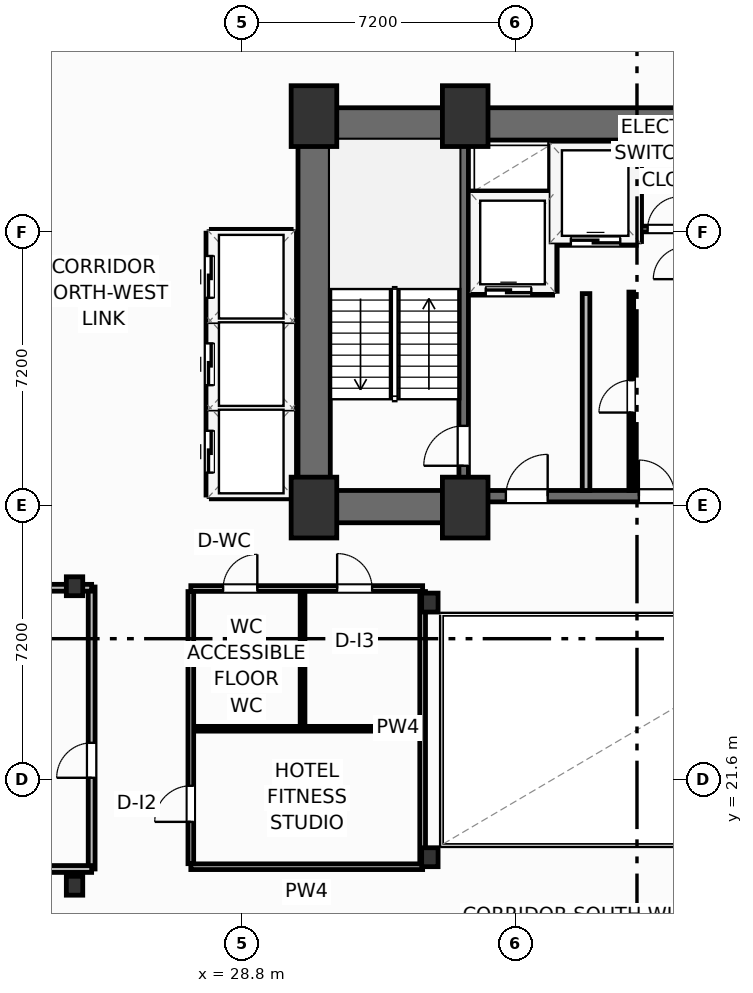
"""IFC4 building model, lengths in metres.
Left out: names, types, materials, properties, quantities, classifications, styles, units other than length and angle.
Written with IfcOpenShell. Run it as: python <this file> out.ifc"""

import sys

from ifc_helpers import new_model, si_unit, direction, frame, frame_2d, origin, origin_2d, place, context, subcontext, project, spatial, rectangle, i_section, extrude, element, fill, save


model = new_model("IFC4")
c1 = context("Model", 3, precision=1e-05, world=origin(), true_north=direction((0.0, 1.0)))
c2 = subcontext(c1, "Body", "Model", "MODEL_VIEW")
j1 = project(units=[si_unit("LENGTHUNIT", "METRE"), si_unit("PLANEANGLEUNIT", "RADIAN")], contexts=[c1])
p1 = place(None, origin())
s1 = spatial("IfcSite", under=j1, at=p1, CompositionType="ELEMENT")
p2 = place(p1, origin())
s2 = spatial("IfcBuilding", under=s1, at=p2, CompositionType="ELEMENT")
p3 = place(p2, frame((0.0, 0.0, 49.2)))
s3 = spatial("IfcBuildingStorey", under=s2, at=p3, CompositionType="ELEMENT", Elevation=49.2)
for number, where, z_axis, x_axis in (
    (1, (30.7, 28.75, 0.0), (0.0, 0.0, 1.0), (1.0, 0.0, 0.0)),
    (2, (34.68, 28.75, 0.0), (0.0, 0.0, 1.0), (1.0, 0.0, 0.0)),
    (3, (30.7, 39.05, 0.0), (0.0, 0.0, 1.0), (1.0, 0.0, 0.0)),
    (4, (34.68, 39.05, 0.0), (0.0, 0.0, 1.0), (1.0, 0.0, 0.0)),
):
    element("IfcColumn", number, at=place(p3, frame(where, z_axis=z_axis, x_axis=x_axis)), inside=s3, PredefinedType="COLUMN", context=c2, shape_type="SweptSolid", body=[
        extrude(rectangle(XDim=1.2, YDim=1.6, at=origin_2d()), origin(), (0.0, 0.0, 1.0), 3.7),
    ])
for number, where, z_axis, x_axis in (
    (5, (33.75, 19.55, 0.0), (0.0, 0.0, 1.0), (1.0, 0.0, 0.0)),
    (6, (33.75, 26.25, 0.0), (0.0, 0.0, 1.0), (1.0, 0.0, 0.0)),
    (7, (24.4, 18.8, 0.0), (0.0, 0.0, 1.0), (1.0, 0.0, 0.0)),
    (8, (24.4, 26.68, 0.0), (0.0, 0.0, 1.0), (1.0, 0.0, 0.0)),
):
    element("IfcColumn", number, at=place(p3, frame(where, z_axis=z_axis, x_axis=x_axis)), inside=s3, PredefinedType="COLUMN", context=c2, shape_type="SweptSolid", body=[
        extrude(i_section(OverallWidth=0.432, OverallDepth=0.498, WebThickness=0.056, FlangeThickness=0.089, FilletRadius=0.025, at=origin_2d()), origin(), (0.0, 0.0, 1.0), 3.7),
    ])
p4 = place(p3, frame((30.28, 38.845, 0.0), z_axis=(0.0, 0.0, 1.0), x_axis=(1.0, 0.0, 0.0)))
e9 = element("IfcWall", 9, at=p4, inside=s3, PredefinedType="SHEAR", context=c2, shape_type="SweptSolid", body=[
    extrude(rectangle(XDim=17.84, YDim=0.85, at=frame_2d((8.92, 0.0))), origin(), (0.0, 0.0, 1.0), 3.45),
])
p5 = place(p3, frame((30.705, 29.2, 0.0), z_axis=(0.0, 0.0, 1.0), x_axis=(0.0, 1.0, 0.0)))
e10 = element("IfcWall", 10, at=p5, inside=s3, PredefinedType="SHEAR", context=c2, shape_type="SweptSolid", body=[
    extrude(rectangle(XDim=9.22, YDim=0.85, at=frame_2d((4.61, 0.0))), origin(), (0.0, 0.0, 1.0), 3.45),
])
p6 = place(p3, frame((30.28, 28.775, 0.0), z_axis=(0.0, 0.0, 1.0), x_axis=(1.0, 0.0, 0.0)))
e11 = element("IfcWall", 11, at=p6, inside=s3, PredefinedType="SHEAR", context=c2, shape_type="SweptSolid", body=[
    extrude(rectangle(XDim=4.52, YDim=0.85, at=frame_2d((2.26, 0.0))), origin(), (0.0, 0.0, 1.0), 3.45),
])
p7 = place(p3, frame((34.8, 29.05, 0.0), z_axis=(0.0, 0.0, 1.0), x_axis=(1.0, 0.0, 0.0)))
e12 = element("IfcWall", 12, at=p7, inside=s3, PredefinedType="SHEAR", context=c2, shape_type="SweptSolid", body=[
    extrude(rectangle(XDim=8.8, YDim=0.3, at=frame_2d((4.4, 0.0))), origin(), (0.0, 0.0, 1.0), 3.45),
])
p8 = place(p7, frame((0.95, 0.0, 0.0)))
e13 = element("IfcOpeningElement", 13, at=p8, cuts=e12, PredefinedType="OPENING", context=c2, shape_type="SweptSolid", body=[
    extrude(rectangle(XDim=1.1, YDim=2.15, at=frame_2d((0.55, 1.075))), frame((0.0, 0.16, 0.0), z_axis=(0.0, -1.0, 0.0), x_axis=(1.0, 0.0, 0.0)), (0.0, 0.0, 1.0), 0.32),
])
p9 = place(p7, frame((6.75, 0.0, 0.0)))
e14 = element("IfcOpeningElement", 14, at=p9, cuts=e12, PredefinedType="OPENING", context=c2, shape_type="SweptSolid", body=[
    extrude(rectangle(XDim=1.1, YDim=2.15, at=frame_2d((0.55, 1.075))), frame((0.0, 0.16, 0.0), z_axis=(0.0, -1.0, 0.0), x_axis=(1.0, 0.0, 0.0)), (0.0, 0.0, 1.0), 0.32),
])
p10 = place(p7, frame((4.45, 0.0, 0.0)))
e15 = element("IfcOpeningElement", 15, at=p10, cuts=e12, PredefinedType="OPENING", context=c2, shape_type="SweptSolid", body=[
    extrude(rectangle(XDim=0.95, YDim=2.15, at=frame_2d((0.475, 1.075))), frame((0.0, 0.16, 0.0), z_axis=(0.0, -1.0, 0.0), x_axis=(1.0, 0.0, 0.0)), (0.0, 0.0, 1.0), 0.32),
])
p11 = place(p3, frame((34.64, 29.2, 0.0), z_axis=(0.0, 0.0, 1.0), x_axis=(0.0, 1.0, 0.0)))
e16 = element("IfcWall", 16, at=p11, inside=s3, PredefinedType="SHEAR", context=c2, shape_type="SweptSolid", body=[
    extrude(rectangle(XDim=9.22, YDim=0.25, at=frame_2d((4.61, 0.0))), origin(), (0.0, 0.0, 1.0), 3.45),
])
p12 = place(p11, frame((0.65, 0.0, 0.0)))
e17 = element("IfcOpeningElement", 17, at=p12, cuts=e16, PredefinedType="OPENING", context=c2, shape_type="SweptSolid", body=[
    extrude(rectangle(XDim=1.05, YDim=2.15, at=frame_2d((0.525, 1.075))), frame((0.0, 0.135, 0.0), z_axis=(0.0, -1.0, 0.0), x_axis=(1.0, 0.0, 0.0)), (0.0, 0.0, 1.0), 0.27),
])
p13 = place(p3, frame((24.85, 19.24, 0.0), z_axis=(0.0, 0.0, 1.0), x_axis=(0.0, 1.0, 0.0)))
e18 = element("IfcWall", 18, at=p13, inside=s3, PredefinedType="PARTITIONING", context=c2, shape_type="SweptSolid", body=[
    extrude(rectangle(XDim=7.42, YDim=0.18, at=frame_2d((3.71, 0.0))), origin(), (0.0, 0.0, 1.0), 3.45),
])
p14 = place(p13, frame((2.4, 0.0, 0.0)))
e19 = element("IfcOpeningElement", 19, at=p14, cuts=e18, PredefinedType="OPENING", context=c2, shape_type="SweptSolid", body=[
    extrude(rectangle(XDim=0.92, YDim=2.05, at=frame_2d((0.46, 1.025))), frame((0.0, 0.1, 0.0), z_axis=(0.0, -1.0, 0.0), x_axis=(1.0, 0.0, 0.0)), (0.0, 0.0, 1.0), 0.2),
])
p15 = place(p3, frame((3.645, 19.24, 0.0), z_axis=(0.0, 0.0, 1.0), x_axis=(1.0, 0.0, 0.0)))
e20 = element("IfcWall", 20, at=p15, inside=s3, PredefinedType="PARTITIONING", context=c2, shape_type="SweptSolid", body=[
    extrude(rectangle(XDim=21.205, YDim=0.18, at=frame_2d((10.603, 0.0))), origin(), (0.0, 0.0, 1.0), 2.58),
])
p16 = place(p3, frame((19.2, 26.64, 0.0), z_axis=(0.0, 0.0, 1.0), x_axis=(1.0, 0.0, 0.0)))
e21 = element("IfcWall", 21, at=p16, inside=s3, PredefinedType="PARTITIONING", context=c2, shape_type="SweptSolid", body=[
    extrude(rectangle(XDim=5.65, YDim=0.18, at=frame_2d((2.825, 0.0))), origin(), (0.0, 0.0, 1.0), 2.662),
])
p17 = place(p3, frame((37.86, 29.2, 0.0), z_axis=(0.0, 0.0, 1.0), x_axis=(0.0, 1.0, 0.0)))
e22 = element("IfcWall", 22, at=p17, inside=s3, PredefinedType="PARTITIONING", context=c2, shape_type="SweptSolid", body=[
    extrude(rectangle(XDim=5.18, YDim=0.2, at=frame_2d((2.59, 0.0))), origin(), (0.0, 0.0, 1.0), 3.45),
])
p18 = place(p3, frame((34.8, 34.44, 0.0), z_axis=(0.0, 0.0, 1.0), x_axis=(1.0, 0.0, 0.0)))
e23 = element("IfcWall", 23, at=p18, inside=s3, PredefinedType="PARTITIONING", context=c2, shape_type="SweptSolid", body=[
    extrude(rectangle(XDim=2.18, YDim=0.2, at=frame_2d((1.09, 0.0))), origin(), (0.0, 0.0, 1.0), 3.45),
])
p19 = place(p18, frame((0.42, 0.0, 0.0)))
e24 = element("IfcOpeningElement", 24, at=p19, cuts=e23, PredefinedType="OPENING", context=c2, shape_type="SweptSolid", body=[
    extrude(rectangle(XDim=1.2, YDim=2.2, at=frame_2d((0.6, 1.1))), frame((0.0, 0.11, 0.0), z_axis=(0.0, -1.0, 0.0), x_axis=(1.0, 0.0, 0.0)), (0.0, 0.0, 1.0), 0.22),
])
p20 = place(p3, frame((34.8, 36.98, 0.0), z_axis=(0.0, 0.0, 1.0), x_axis=(1.0, 0.0, 0.0)))
e25 = element("IfcWall", 25, at=p20, inside=s3, PredefinedType="PARTITIONING", context=c2, shape_type="SweptSolid", body=[
    extrude(rectangle(XDim=2.18, YDim=0.2, at=frame_2d((1.09, 0.0))), origin(), (0.0, 0.0, 1.0), 3.45),
])
p21 = place(p3, frame((37.0, 34.44, 0.0), z_axis=(0.0, 0.0, 1.0), x_axis=(0.0, 1.0, 0.0)))
e26 = element("IfcWall", 26, at=p21, inside=s3, PredefinedType="PARTITIONING", context=c2, shape_type="SweptSolid", body=[
    extrude(rectangle(XDim=3.9, YDim=0.2, at=frame_2d((1.95, 0.0))), origin(), (0.0, 0.0, 1.0), 3.45),
])
p22 = place(p3, frame((37.06, 35.75, 0.0), z_axis=(0.0, 0.0, 1.0), x_axis=(1.0, 0.0, 0.0)))
e27 = element("IfcWall", 27, at=p22, inside=s3, PredefinedType="PARTITIONING", context=c2, shape_type="SweptSolid", body=[
    extrude(rectangle(XDim=2.12, YDim=0.2, at=frame_2d((1.06, 0.0))), origin(), (0.0, 0.0, 1.0), 3.45),
])
p23 = place(p22, frame((0.4, 0.0, 0.0)))
e28 = element("IfcOpeningElement", 28, at=p23, cuts=e27, PredefinedType="OPENING", context=c2, shape_type="SweptSolid", body=[
    extrude(rectangle(XDim=1.3, YDim=2.2, at=frame_2d((0.65, 1.1))), frame((0.0, 0.11, 0.0), z_axis=(0.0, -1.0, 0.0), x_axis=(1.0, 0.0, 0.0)), (0.0, 0.0, 1.0), 0.22),
])
p24 = place(p3, frame((39.22, 35.75, 0.0), z_axis=(0.0, 0.0, 1.0), x_axis=(0.0, 1.0, 0.0)))
e29 = element("IfcWall", 29, at=p24, inside=s3, PredefinedType="PARTITIONING", context=c2, shape_type="SweptSolid", body=[
    extrude(rectangle(XDim=2.59, YDim=0.2, at=frame_2d((1.295, 0.0))), origin(), (0.0, 0.0, 1.0), 3.45),
])
p25 = place(p3, frame((39.3, 36.08, 0.0), z_axis=(0.0, 0.0, 1.0), x_axis=(1.0, 0.0, 0.0)))
e30 = element("IfcWall", 30, at=p25, inside=s3, PredefinedType="PARTITIONING", context=c2, shape_type="SweptSolid", body=[
    extrude(rectangle(XDim=2.02, YDim=0.15, at=frame_2d((1.01, 0.0))), origin(), (0.0, 0.0, 1.0), 3.45),
])
p26 = place(p25, frame((0.18, 0.0, 0.0)))
e31 = element("IfcOpeningElement", 31, at=p26, cuts=e30, PredefinedType="OPENING", context=c2, shape_type="SweptSolid", body=[
    extrude(rectangle(XDim=0.85, YDim=2.05, at=frame_2d((0.425, 1.025))), frame((0.0, 0.085, 0.0), z_axis=(0.0, -1.0, 0.0), x_axis=(1.0, 0.0, 0.0)), (0.0, 0.0, 1.0), 0.17),
])
p27 = place(p3, frame((39.05, 29.2, 0.0), z_axis=(0.0, 0.0, 1.0), x_axis=(0.0, 1.0, 0.0)))
e32 = element("IfcWall", 32, at=p27, inside=s3, PredefinedType="PARTITIONING", context=c2, shape_type="SweptSolid", body=[
    extrude(rectangle(XDim=5.22, YDim=0.125, at=frame_2d((2.61, 0.0))), origin(), (0.0, 0.0, 1.0), 3.45),
])
p28 = place(p27, frame((2.05, 0.0, 0.0)))
e33 = element("IfcOpeningElement", 33, at=p28, cuts=e32, PredefinedType="OPENING", context=c2, shape_type="SweptSolid", body=[
    extrude(rectangle(XDim=0.85, YDim=2.05, at=frame_2d((0.425, 1.025))), frame((0.0, 0.073, 0.0), z_axis=(0.0, -1.0, 0.0), x_axis=(1.0, 0.0, 0.0)), (0.0, 0.0, 1.0), 0.145),
])
p29 = place(p3, frame((27.46, 19.3, 0.0), z_axis=(0.0, 0.0, 1.0), x_axis=(1.0, 0.0, 0.0)))
e34 = element("IfcWall", 34, at=p29, inside=s3, PredefinedType="PARTITIONING", context=c2, shape_type="SweptSolid", body=[
    extrude(rectangle(XDim=6.1, YDim=0.15, at=frame_2d((3.05, 0.0))), origin(), (0.0, 0.0, 1.0), 2.662),
])
p30 = place(p3, frame((27.46, 26.62, 0.0), z_axis=(0.0, 0.0, 1.0), x_axis=(1.0, 0.0, 0.0)))
e35 = element("IfcWall", 35, at=p30, inside=s3, PredefinedType="PARTITIONING", context=c2, shape_type="SweptSolid", body=[
    extrude(rectangle(XDim=6.1, YDim=0.15, at=frame_2d((3.05, 0.0))), origin(), (0.0, 0.0, 1.0), 2.662),
])
p31 = place(p30, frame((0.85, 0.0, 0.0)))
e36 = element("IfcOpeningElement", 36, at=p31, cuts=e35, PredefinedType="OPENING", context=c2, shape_type="SweptSolid", body=[
    extrude(rectangle(XDim=0.9, YDim=2.05, at=frame_2d((0.45, 1.025))), frame((0.0, 0.085, 0.0), z_axis=(0.0, -1.0, 0.0), x_axis=(1.0, 0.0, 0.0)), (0.0, 0.0, 1.0), 0.17),
])
p32 = place(p30, frame((3.85, 0.0, 0.0)))
e37 = element("IfcOpeningElement", 37, at=p32, cuts=e35, PredefinedType="OPENING", context=c2, shape_type="SweptSolid", body=[
    extrude(rectangle(XDim=0.92, YDim=2.05, at=frame_2d((0.46, 1.025))), frame((0.0, 0.085, 0.0), z_axis=(0.0, -1.0, 0.0), x_axis=(1.0, 0.0, 0.0)), (0.0, 0.0, 1.0), 0.17),
])
p33 = place(p3, frame((27.52, 22.93, 0.0), z_axis=(0.0, 0.0, 1.0), x_axis=(1.0, 0.0, 0.0)))
e38 = element("IfcWall", 38, at=p33, inside=s3, PredefinedType="PARTITIONING", context=c2, shape_type="SweptSolid", body=[
    extrude(rectangle(XDim=6.0, YDim=0.125, at=frame_2d((3.0, 0.0))), origin(), (0.0, 0.0, 1.0), 3.45),
])
p34 = place(p3, frame((30.4, 23.0, 0.0), z_axis=(0.0, 0.0, 1.0), x_axis=(0.0, 1.0, 0.0)))
e39 = element("IfcWall", 39, at=p34, inside=s3, PredefinedType="PARTITIONING", context=c2, shape_type="SweptSolid", body=[
    extrude(rectangle(XDim=3.54, YDim=0.125, at=frame_2d((1.77, 0.0))), origin(), (0.0, 0.0, 1.0), 3.45),
])
p35 = place(p3, frame((27.46, 19.38, 0.0), z_axis=(0.0, 0.0, 1.0), x_axis=(0.0, 1.0, 0.0)))
e40 = element("IfcWall", 40, at=p35, inside=s3, PredefinedType="PARTITIONING", context=c2, shape_type="SweptSolid", body=[
    extrude(rectangle(XDim=7.16, YDim=0.15, at=frame_2d((3.58, 0.0))), origin(), (0.0, 0.0, 1.0), 3.45),
])
p36 = place(p35, frame((1.1, 0.0, 0.0)))
e41 = element("IfcOpeningElement", 41, at=p36, cuts=e40, PredefinedType="OPENING", context=c2, shape_type="SweptSolid", body=[
    extrude(rectangle(XDim=0.95, YDim=2.05, at=frame_2d((0.475, 1.025))), frame((0.0, 0.085, 0.0), z_axis=(0.0, -1.0, 0.0), x_axis=(1.0, 0.0, 0.0)), (0.0, 0.0, 1.0), 0.17),
])
p37 = place(p3, frame((33.56, 19.38, 0.0), z_axis=(0.0, 0.0, 1.0), x_axis=(0.0, 1.0, 0.0)))
e42 = element("IfcWall", 42, at=p37, inside=s3, PredefinedType="PARTITIONING", context=c2, shape_type="SweptSolid", body=[
    extrude(rectangle(XDim=7.16, YDim=0.15, at=frame_2d((3.58, 0.0))), origin(), (0.0, 0.0, 1.0), 2.824),
])
for number, where, z_axis, x_axis in (
    (43, (28.02, 31.375, 0.0), (0.0, 0.0, 1.0), (1.0, 0.0, 0.0)),
    (44, (28.02, 33.675, 0.0), (0.0, 0.0, 1.0), (1.0, 0.0, 0.0)),
):
    element("IfcWall", number, at=place(p3, frame(where, z_axis=z_axis, x_axis=x_axis)), inside=s3, PredefinedType="PARTITIONING", context=c2, shape_type="SweptSolid", body=[
        extrude(rectangle(XDim=2.06, YDim=0.2, at=frame_2d((1.03, 0.0))), origin(), (0.0, 0.0, 1.0), 3.45),
    ])
for number, where, z_axis, x_axis in (
    (45, (28.0, 29.08, 0.0), (0.0, 0.0, 1.0), (1.0, 0.0, 0.0)),
    (46, (28.0, 35.97, 0.0), (0.0, 0.0, 1.0), (1.0, 0.0, 0.0)),
):
    element("IfcWall", number, at=place(p3, frame(where, z_axis=z_axis, x_axis=x_axis)), inside=s3, PredefinedType="PARTITIONING", context=c2, shape_type="SweptSolid", body=[
        extrude(rectangle(XDim=2.1, YDim=0.2, at=frame_2d((1.05, 0.0))), origin(), (0.0, 0.0, 1.0), 3.45),
    ])
p38 = place(p3, frame((30.12, 29.08, 0.0), z_axis=(0.0, 0.0, 1.0), x_axis=(0.0, 1.0, 0.0)))
e47 = element("IfcWall", 47, at=p38, inside=s3, PredefinedType="PARTITIONING", context=c2, shape_type="SweptSolid", body=[
    extrude(rectangle(XDim=6.89, YDim=0.2, at=frame_2d((3.445, 0.0))), origin(), (0.0, 0.0, 1.0), 3.45),
])
p39 = place(p3, frame((27.96, 29.08, 0.0), z_axis=(0.0, 0.0, 1.0), x_axis=(0.0, 1.0, 0.0)))
e48 = element("IfcWall", 48, at=p39, inside=s3, PredefinedType="PARTITIONING", context=c2, shape_type="SweptSolid", body=[
    extrude(rectangle(XDim=6.89, YDim=0.2, at=frame_2d((3.445, 0.0))), origin(), (0.0, 0.0, 1.0), 3.45),
])
p40 = place(p39, frame((0.59, 0.0, 0.0)))
e49 = element("IfcOpeningElement", 49, at=p40, cuts=e48, PredefinedType="OPENING", context=c2, shape_type="SweptSolid", body=[
    extrude(rectangle(XDim=1.1, YDim=2.15, at=frame_2d((0.55, 1.075))), frame((0.0, 0.11, 0.0), z_axis=(0.0, -1.0, 0.0), x_axis=(1.0, 0.0, 0.0)), (0.0, 0.0, 1.0), 0.22),
])
p41 = place(p39, frame((2.89, 0.0, 0.0)))
e50 = element("IfcOpeningElement", 50, at=p41, cuts=e48, PredefinedType="OPENING", context=c2, shape_type="SweptSolid", body=[
    extrude(rectangle(XDim=1.1, YDim=2.15, at=frame_2d((0.55, 1.075))), frame((0.0, 0.11, 0.0), z_axis=(0.0, -1.0, 0.0), x_axis=(1.0, 0.0, 0.0)), (0.0, 0.0, 1.0), 0.22),
])
p42 = place(p39, frame((5.19, 0.0, 0.0)))
e51 = element("IfcOpeningElement", 51, at=p42, cuts=e48, PredefinedType="OPENING", context=c2, shape_type="SweptSolid", body=[
    extrude(rectangle(XDim=1.1, YDim=2.15, at=frame_2d((0.55, 1.075))), frame((0.0, 0.11, 0.0), z_axis=(0.0, -1.0, 0.0), x_axis=(1.0, 0.0, 0.0)), (0.0, 0.0, 1.0), 0.22),
])
p43 = place(p14, origin())
e52 = element("IfcDoor", 52, at=p43, inside=s3, OperationType="SINGLE_SWING_LEFT", PredefinedType="DOOR", context=c2, shape_type="SweptSolid", body=[
    extrude(rectangle(XDim=0.92, YDim=2.05, at=frame_2d((0.46, 1.025))), frame((0.0, 0.025, 0.0), z_axis=(0.0, -1.0, 0.0), x_axis=(1.0, 0.0, 0.0)), (0.0, 0.0, 1.0), 0.05),
])
fill(e19, e52)
p44 = place(p12, origin())
e53 = element("IfcDoor", 53, at=p44, inside=s3, OperationType="SINGLE_SWING_LEFT", PredefinedType="DOOR", context=c2, shape_type="SweptSolid", body=[
    extrude(rectangle(XDim=1.05, YDim=2.15, at=frame_2d((0.525, 1.075))), frame((0.0, 0.025, 0.0), z_axis=(0.0, -1.0, 0.0), x_axis=(1.0, 0.0, 0.0)), (0.0, 0.0, 1.0), 0.05),
])
fill(e17, e53)
p45 = place(p8, origin())
e54 = element("IfcDoor", 54, at=p45, inside=s3, OperationType="SINGLE_SWING_RIGHT", PredefinedType="DOOR", context=c2, shape_type="SweptSolid", body=[
    extrude(rectangle(XDim=1.1, YDim=2.15, at=frame_2d((0.55, 1.075))), frame((0.0, 0.025, 0.0), z_axis=(0.0, -1.0, 0.0), x_axis=(1.0, 0.0, 0.0)), (0.0, 0.0, 1.0), 0.05),
])
fill(e13, e54)
p46 = place(p19, origin())
e55 = element("IfcDoor", 55, at=p46, inside=s3, OperationType="SLIDING_TO_LEFT", PredefinedType="DOOR", context=c2, shape_type="SweptSolid", body=[
    extrude(rectangle(XDim=1.2, YDim=2.2, at=frame_2d((0.6, 1.1))), frame((0.0, 0.025, 0.0), z_axis=(0.0, -1.0, 0.0), x_axis=(1.0, 0.0, 0.0)), (0.0, 0.0, 1.0), 0.05),
])
fill(e24, e55)
p47 = place(p23, origin())
e56 = element("IfcDoor", 56, at=p47, inside=s3, OperationType="SLIDING_TO_LEFT", PredefinedType="DOOR", context=c2, shape_type="SweptSolid", body=[
    extrude(rectangle(XDim=1.3, YDim=2.2, at=frame_2d((0.65, 1.1))), frame((0.0, 0.025, 0.0), z_axis=(0.0, -1.0, 0.0), x_axis=(1.0, 0.0, 0.0)), (0.0, 0.0, 1.0), 0.05),
])
fill(e28, e56)
p48 = place(p26, origin())
e57 = element("IfcDoor", 57, at=p48, inside=s3, OperationType="SINGLE_SWING_RIGHT", PredefinedType="DOOR", context=c2, shape_type="SweptSolid", body=[
    extrude(rectangle(XDim=0.85, YDim=2.05, at=frame_2d((0.425, 1.025))), frame((0.0, 0.025, 0.0), z_axis=(0.0, -1.0, 0.0), x_axis=(1.0, 0.0, 0.0)), (0.0, 0.0, 1.0), 0.05),
])
fill(e31, e57)
p49 = place(p28, origin())
e58 = element("IfcDoor", 58, at=p49, inside=s3, OperationType="SINGLE_SWING_LEFT", PredefinedType="DOOR", context=c2, shape_type="SweptSolid", body=[
    extrude(rectangle(XDim=0.85, YDim=2.05, at=frame_2d((0.425, 1.025))), frame((0.0, 0.025, 0.0), z_axis=(0.0, -1.0, 0.0), x_axis=(1.0, 0.0, 0.0)), (0.0, 0.0, 1.0), 0.05),
])
fill(e33, e58)
p50 = place(p10, origin())
e59 = element("IfcDoor", 59, at=p50, inside=s3, OperationType="SINGLE_SWING_LEFT", PredefinedType="DOOR", context=c2, shape_type="SweptSolid", body=[
    extrude(rectangle(XDim=0.95, YDim=2.15, at=frame_2d((0.475, 1.075))), frame((0.0, 0.025, 0.0), z_axis=(0.0, -1.0, 0.0), x_axis=(1.0, 0.0, 0.0)), (0.0, 0.0, 1.0), 0.05),
])
fill(e15, e59)
p51 = place(p31, origin())
e60 = element("IfcDoor", 60, at=p51, inside=s3, OperationType="SINGLE_SWING_RIGHT", PredefinedType="DOOR", context=c2, shape_type="SweptSolid", body=[
    extrude(rectangle(XDim=0.9, YDim=2.05, at=frame_2d((0.45, 1.025))), frame((0.0, 0.025, 0.0), z_axis=(0.0, -1.0, 0.0), x_axis=(1.0, 0.0, 0.0)), (0.0, 0.0, 1.0), 0.05),
])
fill(e36, e60)
p52 = place(p32, origin())
e61 = element("IfcDoor", 61, at=p52, inside=s3, OperationType="SINGLE_SWING_LEFT", PredefinedType="DOOR", context=c2, shape_type="SweptSolid", body=[
    extrude(rectangle(XDim=0.92, YDim=2.05, at=frame_2d((0.46, 1.025))), frame((0.0, 0.025, 0.0), z_axis=(0.0, -1.0, 0.0), x_axis=(1.0, 0.0, 0.0)), (0.0, 0.0, 1.0), 0.05),
])
fill(e37, e61)
p53 = place(p36, origin())
e62 = element("IfcDoor", 62, at=p53, inside=s3, OperationType="SINGLE_SWING_LEFT", PredefinedType="DOOR", context=c2, shape_type="SweptSolid", body=[
    extrude(rectangle(XDim=0.95, YDim=2.05, at=frame_2d((0.475, 1.025))), frame((0.0, 0.025, 0.0), z_axis=(0.0, -1.0, 0.0), x_axis=(1.0, 0.0, 0.0)), (0.0, 0.0, 1.0), 0.05),
])
fill(e41, e62)
p54 = place(p40, origin())
e63 = element("IfcDoor", 63, at=p54, inside=s3, OperationType="SLIDING_TO_LEFT", PredefinedType="DOOR", context=c2, shape_type="SweptSolid", body=[
    extrude(rectangle(XDim=1.1, YDim=2.15, at=frame_2d((0.55, 1.075))), frame((0.0, 0.025, 0.0), z_axis=(0.0, -1.0, 0.0), x_axis=(1.0, 0.0, 0.0)), (0.0, 0.0, 1.0), 0.05),
])
fill(e49, e63)
p55 = place(p41, origin())
e64 = element("IfcDoor", 64, at=p55, inside=s3, OperationType="SLIDING_TO_LEFT", PredefinedType="DOOR", context=c2, shape_type="SweptSolid", body=[
    extrude(rectangle(XDim=1.1, YDim=2.15, at=frame_2d((0.55, 1.075))), frame((0.0, 0.025, 0.0), z_axis=(0.0, -1.0, 0.0), x_axis=(1.0, 0.0, 0.0)), (0.0, 0.0, 1.0), 0.05),
])
fill(e50, e64)
p56 = place(p42, origin())
e65 = element("IfcDoor", 65, at=p56, inside=s3, OperationType="SLIDING_TO_LEFT", PredefinedType="DOOR", context=c2, shape_type="SweptSolid", body=[
    extrude(rectangle(XDim=1.1, YDim=2.15, at=frame_2d((0.55, 1.075))), frame((0.0, 0.025, 0.0), z_axis=(0.0, -1.0, 0.0), x_axis=(1.0, 0.0, 0.0)), (0.0, 0.0, 1.0), 0.05),
])
fill(e51, e65)
save(model, sys.argv[1])
